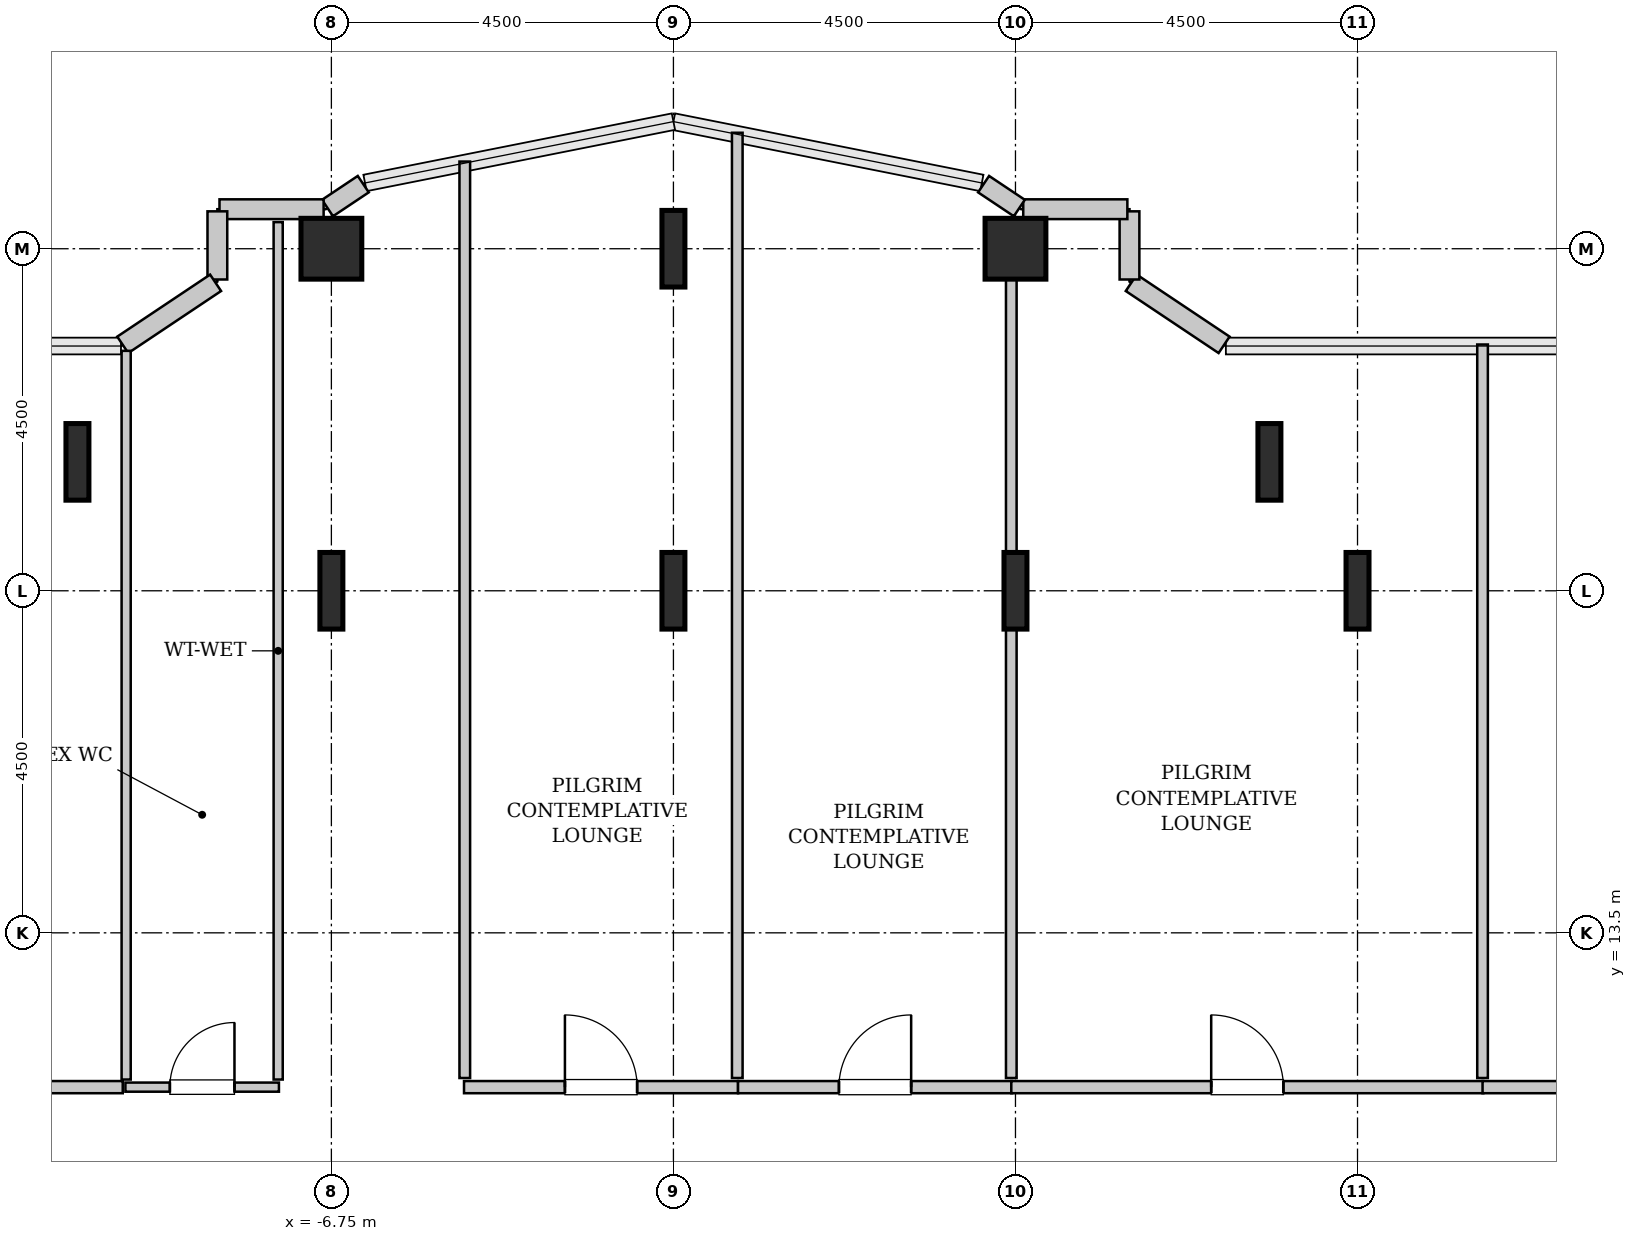
"""IFC4 building model, lengths in metres.
Left out: names, types, materials, properties, quantities, classifications, styles, units other than length and angle.
Written with IfcOpenShell. Run it as: python <this file> out.ifc"""

import sys

from ifc_helpers import new_model, si_unit, direction, frame, frame_2d, origin, origin_2d, place, context, subcontext, project, spatial, rectangle, hollow_rectangle, i_section, extrude, source, transform, mapped, element, fill, save


model = new_model("IFC4")
c1 = context("Model", 3, precision=1e-05, world=origin(), true_north=direction((0.0, 1.0)))
c2 = subcontext(c1, "Body", "Model", "MODEL_VIEW")
j1 = project(units=[si_unit("LENGTHUNIT", "METRE"), si_unit("PLANEANGLEUNIT", "RADIAN")], contexts=[c1])
p1 = place(None, origin())
s1 = spatial("IfcSite", under=j1, at=p1, CompositionType="ELEMENT")
p2 = place(p1, origin())
s2 = spatial("IfcBuilding", under=s1, at=p2, CompositionType="ELEMENT")
p3 = place(p2, frame((0.0, 0.0, 128.8)))
s3 = spatial("IfcBuildingStorey", under=s2, at=p3, CompositionType="ELEMENT", Elevation=128.8)
m1 = source(origin(), c2, "Body", "SweptSolid", [
    extrude(i_section(OverallWidth=0.302, OverallDepth=1.008, WebThickness=0.021, FlangeThickness=0.04, FilletRadius=0.03, at=origin_2d()), origin(), (0.0, 0.0, 1.0), 3.8),
])
for number, where, z_axis, x_axis in (
    (1, (-10.091, 19.696, 0.0), (0.0, 0.0, 1.0), (1.0, 0.0, 0.0)),
    (2, (-6.75, 18.0, 0.0), (0.0, 0.0, 1.0), (1.0, 0.0, 0.0)),
):
    element("IfcColumn", number, at=place(p3, frame(where, z_axis=z_axis, x_axis=x_axis)), inside=s3, PredefinedType="COLUMN", context=c2, shape_type="MappedRepresentation", body=[
        mapped(m1, transform((0.0, 0.0, 0.0), x_axis=(1.0, 0.0, 0.0), y_axis=(0.0, 1.0, 0.0), z_axis=(0.0, 0.0, 1.0), scale=1.0)),
    ])
m2 = source(origin(), c2, "Body", "SweptSolid", [
    extrude(hollow_rectangle(XDim=0.8, YDim=0.8, WallThickness=0.04, InnerFilletRadius=0.04, OuterFilletRadius=0.08, at=origin_2d()), origin(), (0.0, 0.0, 1.0), 3.8),
])
p4 = place(p3, frame((-6.75, 22.5, 0.0), z_axis=(0.0, 0.0, 1.0), x_axis=(1.0, 0.0, 0.0)))
e3 = element("IfcColumn", 3, at=p4, inside=s3, PredefinedType="COLUMN", context=c2, shape_type="MappedRepresentation", body=[
    mapped(m2, transform((0.0, 0.0, 0.0), x_axis=(1.0, 0.0, 0.0), y_axis=(0.0, 1.0, 0.0), z_axis=(0.0, 0.0, 1.0), scale=1.0)),
])
for number, where, z_axis, x_axis in (
    (4, (-2.25, 18.0, 0.0), (0.0, 0.0, 1.0), (1.0, 0.0, 0.0)),
    (5, (-2.25, 22.5, 0.0), (0.0, 0.0, 1.0), (1.0, 0.0, 0.0)),
    (6, (2.25, 18.0, 0.0), (0.0, 0.0, 1.0), (1.0, 0.0, 0.0)),
):
    element("IfcColumn", number, at=place(p3, frame(where, z_axis=z_axis, x_axis=x_axis)), inside=s3, PredefinedType="COLUMN", context=c2, shape_type="MappedRepresentation", body=[
        mapped(m1, transform((0.0, 0.0, 0.0), x_axis=(1.0, 0.0, 0.0), y_axis=(0.0, 1.0, 0.0), z_axis=(0.0, 0.0, 1.0), scale=1.0)),
    ])
p5 = place(p3, frame((2.25, 22.5, 0.0), z_axis=(0.0, 0.0, 1.0), x_axis=(1.0, 0.0, 0.0)))
e7 = element("IfcColumn", 7, at=p5, inside=s3, PredefinedType="COLUMN", context=c2, shape_type="MappedRepresentation", body=[
    mapped(m2, transform((0.0, 0.0, 0.0), x_axis=(1.0, 0.0, 0.0), y_axis=(0.0, 1.0, 0.0), z_axis=(0.0, 0.0, 1.0), scale=1.0)),
])
for number, where, z_axis, x_axis in (
    (8, (5.591, 19.696, 0.0), (0.0, 0.0, 1.0), (1.0, 0.0, 0.0)),
    (9, (6.75, 18.0, 0.0), (0.0, 0.0, 1.0), (1.0, 0.0, 0.0)),
):
    element("IfcColumn", number, at=place(p3, frame(where, z_axis=z_axis, x_axis=x_axis)), inside=s3, PredefinedType="COLUMN", context=c2, shape_type="MappedRepresentation", body=[
        mapped(m1, transform((0.0, 0.0, 0.0), x_axis=(1.0, 0.0, 0.0), y_axis=(0.0, 1.0, 0.0), z_axis=(0.0, 0.0, 1.0), scale=1.0)),
    ])
m3 = source(origin(), c2, "Body", "SweptSolid", [
    extrude(rectangle(XDim=1.469, YDim=0.26, at=frame_2d((0.734, 0.0))), origin(), (0.0, 0.0, 1.0), 3.55),
])
p6 = place(p3, frame((4.995, 21.236, 0.0), z_axis=(0.0, 0.0, 1.0), x_axis=(-0.831461760506, 0.555581983884, 0.0)))
e10 = element("IfcWall", 10, at=p6, inside=s3, PredefinedType="SOLIDWALL", context=c2, shape_type="MappedRepresentation", body=[
    mapped(m3, transform((0.0, 0.0, 0.0), x_axis=(1.0, 0.0, 0.0), y_axis=(0.0, 1.0, 0.0), z_axis=(0.0, 0.0, 1.0), scale=1.0)),
])
m4 = source(origin(), c2, "Body", "SweptSolid", [
    extrude(rectangle(XDim=0.897, YDim=0.26, at=frame_2d((0.448, 0.0))), origin(), (0.0, 0.0, 1.0), 3.55),
])
p7 = place(p3, frame((3.75, 22.095, 0.0), z_axis=(0.0, 0.0, 1.0), x_axis=(0.0, 1.0, 0.0)))
e11 = element("IfcWall", 11, at=p7, inside=s3, PredefinedType="SOLIDWALL", context=c2, shape_type="MappedRepresentation", body=[
    mapped(m4, transform((0.0, 0.0, 0.0), x_axis=(1.0, 0.0, 0.0), y_axis=(0.0, 1.0, 0.0), z_axis=(0.0, 0.0, 1.0), scale=1.0)),
])
m5 = source(origin(), c2, "Body", "SweptSolid", [
    extrude(rectangle(XDim=1.37, YDim=0.26, at=frame_2d((0.685, 0.0))), origin(), (0.0, 0.0, 1.0), 3.55),
])
p8 = place(p3, frame((3.722, 23.02, 0.0), z_axis=(0.0, 0.0, 1.0), x_axis=(-1.0, 0.0, 0.0)))
e12 = element("IfcWall", 12, at=p8, inside=s3, PredefinedType="SOLIDWALL", context=c2, shape_type="MappedRepresentation", body=[
    mapped(m5, transform((0.0, 0.0, 0.0), x_axis=(1.0, 0.0, 0.0), y_axis=(0.0, 1.0, 0.0), z_axis=(0.0, 0.0, 1.0), scale=1.0)),
])
m6 = source(origin(), c2, "Body", "SweptSolid", [
    extrude(rectangle(XDim=0.565, YDim=0.26, at=frame_2d((0.283, 0.0))), origin(), (0.0, 0.0, 1.0), 3.55),
])
for number, where, z_axis, x_axis in (
    (13, (2.301, 23.036, 0.0), (0.0, 0.0, 1.0), (-0.832, 0.555, 0.0)),
    (14, (-6.331, 23.35, 0.0), (0.0, 0.0, 1.0), (-0.832, -0.555, 0.0)),
):
    element("IfcWall", number, at=place(p3, frame(where, z_axis=z_axis, x_axis=x_axis)), inside=s3, PredefinedType="SOLIDWALL", context=c2, shape_type="MappedRepresentation", body=[
        mapped(m6, transform((0.0, 0.0, 0.0), x_axis=(1.0, 0.0, 0.0), y_axis=(0.0, 1.0, 0.0), z_axis=(0.0, 0.0, 1.0), scale=1.0)),
    ])
p9 = place(p3, frame((-6.852, 23.02, 0.0), z_axis=(0.0, 0.0, 1.0), x_axis=(-1.0, 0.0, 0.0)))
e15 = element("IfcWall", 15, at=p9, inside=s3, PredefinedType="SOLIDWALL", context=c2, shape_type="MappedRepresentation", body=[
    mapped(m5, transform((0.0, 0.0, 0.0), x_axis=(1.0, 0.0, 0.0), y_axis=(0.0, 1.0, 0.0), z_axis=(0.0, 0.0, 1.0), scale=1.0)),
])
p10 = place(p3, frame((-8.25, 22.992, 0.0), z_axis=(0.0, 0.0, 1.0), x_axis=(0.0, -1.0, 0.0)))
e16 = element("IfcWall", 16, at=p10, inside=s3, PredefinedType="SOLIDWALL", context=c2, shape_type="MappedRepresentation", body=[
    mapped(m4, transform((0.0, 0.0, 0.0), x_axis=(1.0, 0.0, 0.0), y_axis=(0.0, 1.0, 0.0), z_axis=(0.0, 0.0, 1.0), scale=1.0)),
])
p11 = place(p3, frame((-8.273, 22.052, 0.0), z_axis=(0.0, 0.0, 1.0), x_axis=(-0.831461760506, -0.555581983884, 0.0)))
e17 = element("IfcWall", 17, at=p11, inside=s3, PredefinedType="SOLIDWALL", context=c2, shape_type="MappedRepresentation", body=[
    mapped(m3, transform((0.0, 0.0, 0.0), x_axis=(1.0, 0.0, 0.0), y_axis=(0.0, 1.0, 0.0), z_axis=(0.0, 0.0, 1.0), scale=1.0)),
])
m7 = source(origin(), c2, "Body", "SweptSolid", [
    extrude(rectangle(XDim=2.02, YDim=0.12, at=frame_2d((1.01, 0.0))), origin(), (0.0, 0.0, 1.0), 3.535),
])
p12 = place(p3, frame((-9.46, 11.47, 0.0), z_axis=(0.0, 0.0, 1.0), x_axis=(1.0, 0.0, 0.0)))
e18 = element("IfcWall", 18, at=p12, inside=s3, PredefinedType="PLUMBINGWALL", context=c2, shape_type="MappedRepresentation", body=[
    mapped(m7, transform((0.0, 0.0, 0.0), x_axis=(1.0, 0.0, 0.0), y_axis=(0.0, 1.0, 0.0), z_axis=(0.0, 0.0, 1.0), scale=1.0)),
])
p13 = place(p12, frame((0.585, 0.0, 0.0)))
e19 = element("IfcOpeningElement", 19, at=p13, cuts=e18, PredefinedType="OPENING", context=c2, shape_type="SweptSolid", body=[
    extrude(rectangle(XDim=0.85, YDim=2.1, at=frame_2d((0.425, 1.05))), frame((0.0, 0.07, 0.0), z_axis=(0.0, -1.0, 0.0), x_axis=(1.0, 0.0, 0.0)), (0.0, 0.0, 1.0), 0.14),
])
m8 = source(origin(), c2, "Body", "SweptSolid", [
    extrude(rectangle(XDim=11.28, YDim=0.12, at=frame_2d((5.64, 0.0))), origin(), (0.0, 0.0, 1.0), 3.535),
])
p14 = place(p3, frame((-7.45, 11.57, 0.0), z_axis=(0.0, 0.0, 1.0), x_axis=(0.0, 1.0, 0.0)))
e20 = element("IfcWall", 20, at=p14, inside=s3, PredefinedType="PLUMBINGWALL", context=c2, shape_type="MappedRepresentation", body=[
    mapped(m8, transform((0.0, 0.0, 0.0), x_axis=(1.0, 0.0, 0.0), y_axis=(0.0, 1.0, 0.0), z_axis=(0.0, 0.0, 1.0), scale=1.0)),
])
m9 = source(origin(), c2, "Body", "SweptSolid", [
    extrude(rectangle(XDim=9.587, YDim=0.12, at=frame_2d((4.793, 0.0))), origin(), (0.0, 0.0, 1.0), 3.535),
])
p15 = place(p3, frame((-9.45, 11.57, 0.0), z_axis=(0.0, 0.0, 1.0), x_axis=(0.0, 1.0, 0.0)))
e21 = element("IfcWall", 21, at=p15, inside=s3, PredefinedType="PLUMBINGWALL", context=c2, shape_type="MappedRepresentation", body=[
    mapped(m9, transform((0.0, 0.0, 0.0), x_axis=(1.0, 0.0, 0.0), y_axis=(0.0, 1.0, 0.0), z_axis=(0.0, 0.0, 1.0), scale=1.0)),
])
m10 = source(origin(), c2, "Body", "SweptSolid", [
    extrude(rectangle(XDim=4.125, YDim=0.16, at=frame_2d((2.062, 0.0))), origin(), (0.0, 0.0, 1.0), 3.535),
])
p16 = place(p3, frame((-13.62, 11.47, 0.0), z_axis=(0.0, 0.0, 1.0), x_axis=(1.0, 0.0, 0.0)))
e22 = element("IfcWall", 22, at=p16, inside=s3, PredefinedType="PARTITIONING", context=c2, shape_type="MappedRepresentation", body=[
    mapped(m10, transform((0.0, 0.0, 0.0), x_axis=(1.0, 0.0, 0.0), y_axis=(0.0, 1.0, 0.0), z_axis=(0.0, 0.0, 1.0), scale=1.0)),
])
p17 = place(p16, frame((1.587, 0.0, 0.0)))
e23 = element("IfcOpeningElement", 23, at=p17, cuts=e22, PredefinedType="OPENING", context=c2, shape_type="SweptSolid", body=[
    extrude(rectangle(XDim=0.95, YDim=2.1, at=frame_2d((0.475, 1.05))), frame((0.0, 0.09, 0.0), z_axis=(0.0, -1.0, 0.0), x_axis=(1.0, 0.0, 0.0)), (0.0, 0.0, 1.0), 0.18),
])
m11 = source(origin(), c2, "Body", "SweptSolid", [
    extrude(rectangle(XDim=3.605, YDim=0.16, at=frame_2d((1.802, 0.0))), origin(), (0.0, 0.0, 1.0), 3.535),
])
p18 = place(p3, frame((-5.005, 11.47, 0.0), z_axis=(0.0, 0.0, 1.0), x_axis=(1.0, 0.0, 0.0)))
e24 = element("IfcWall", 24, at=p18, inside=s3, PredefinedType="PARTITIONING", context=c2, shape_type="MappedRepresentation", body=[
    mapped(m11, transform((0.0, 0.0, 0.0), x_axis=(1.0, 0.0, 0.0), y_axis=(0.0, 1.0, 0.0), z_axis=(0.0, 0.0, 1.0), scale=1.0)),
])
p19 = place(p18, frame((1.327, 0.0, 0.0)))
e25 = element("IfcOpeningElement", 25, at=p19, cuts=e24, PredefinedType="OPENING", context=c2, shape_type="SweptSolid", body=[
    extrude(rectangle(XDim=0.95, YDim=2.1, at=frame_2d((0.475, 1.05))), frame((0.0, 0.09, 0.0), z_axis=(0.0, -1.0, 0.0), x_axis=(1.0, 0.0, 0.0)), (0.0, 0.0, 1.0), 0.18),
])
m12 = source(origin(), c2, "Body", "SweptSolid", [
    extrude(rectangle(XDim=12.436, YDim=0.14, at=frame_2d((6.218, 0.0))), origin(), (0.0, 0.0, 1.0), 3.535),
])
p20 = place(p3, frame((-1.41, 11.59, 0.0), z_axis=(0.0, 0.0, 1.0), x_axis=(0.0, 1.0, 0.0)))
e26 = element("IfcWall", 26, at=p20, inside=s3, PredefinedType="PARTITIONING", context=c2, shape_type="MappedRepresentation", body=[
    mapped(m12, transform((0.0, 0.0, 0.0), x_axis=(1.0, 0.0, 0.0), y_axis=(0.0, 1.0, 0.0), z_axis=(0.0, 0.0, 1.0), scale=1.0)),
])
m13 = source(origin(), c2, "Body", "SweptSolid", [
    extrude(rectangle(XDim=12.057, YDim=0.14, at=frame_2d((6.028, 0.0))), origin(), (0.0, 0.0, 1.0), 3.535),
])
p21 = place(p3, frame((-4.995, 11.59, 0.0), z_axis=(0.0, 0.0, 1.0), x_axis=(0.0, 1.0, 0.0)))
e27 = element("IfcWall", 27, at=p21, inside=s3, PredefinedType="PARTITIONING", context=c2, shape_type="MappedRepresentation", body=[
    mapped(m13, transform((0.0, 0.0, 0.0), x_axis=(1.0, 0.0, 0.0), y_axis=(0.0, 1.0, 0.0), z_axis=(0.0, 0.0, 1.0), scale=1.0)),
])
p22 = place(p3, frame((-1.4, 11.47, 0.0), z_axis=(0.0, 0.0, 1.0), x_axis=(1.0, 0.0, 0.0)))
e28 = element("IfcWall", 28, at=p22, inside=s3, PredefinedType="PARTITIONING", context=c2, shape_type="MappedRepresentation", body=[
    mapped(m11, transform((0.0, 0.0, 0.0), x_axis=(1.0, 0.0, 0.0), y_axis=(0.0, 1.0, 0.0), z_axis=(0.0, 0.0, 1.0), scale=1.0)),
])
p23 = place(p22, frame((1.327, 0.0, 0.0)))
e29 = element("IfcOpeningElement", 29, at=p23, cuts=e28, PredefinedType="OPENING", context=c2, shape_type="SweptSolid", body=[
    extrude(rectangle(XDim=0.95, YDim=2.1, at=frame_2d((0.475, 1.05))), frame((0.0, 0.09, 0.0), z_axis=(0.0, -1.0, 0.0), x_axis=(1.0, 0.0, 0.0)), (0.0, 0.0, 1.0), 0.18),
])
m14 = source(origin(), c2, "Body", "SweptSolid", [
    extrude(rectangle(XDim=11.314, YDim=0.14, at=frame_2d((5.657, 0.0))), origin(), (0.0, 0.0, 1.0), 2.875),
])
p24 = place(p3, frame((2.195, 11.59, 0.0), z_axis=(0.0, 0.0, 1.0), x_axis=(0.0, 1.0, 0.0)))
e30 = element("IfcWall", 30, at=p24, inside=s3, PredefinedType="PARTITIONING", context=c2, shape_type="MappedRepresentation", body=[
    mapped(m14, transform((0.0, 0.0, 0.0), x_axis=(1.0, 0.0, 0.0), y_axis=(0.0, 1.0, 0.0), z_axis=(0.0, 0.0, 1.0), scale=1.0)),
])
m15 = source(origin(), c2, "Body", "SweptSolid", [
    extrude(rectangle(XDim=6.21, YDim=0.16, at=frame_2d((3.105, 0.0))), origin(), (0.0, 0.0, 1.0), 3.535),
])
p25 = place(p3, frame((2.195, 11.47, 0.0), z_axis=(0.0, 0.0, 1.0), x_axis=(1.0, 0.0, 0.0)))
e31 = element("IfcWall", 31, at=p25, inside=s3, PredefinedType="PARTITIONING", context=c2, shape_type="MappedRepresentation", body=[
    mapped(m15, transform((0.0, 0.0, 0.0), x_axis=(1.0, 0.0, 0.0), y_axis=(0.0, 1.0, 0.0), z_axis=(0.0, 0.0, 1.0), scale=1.0)),
])
p26 = place(p25, frame((2.63, 0.0, 0.0)))
e32 = element("IfcOpeningElement", 32, at=p26, cuts=e31, PredefinedType="OPENING", context=c2, shape_type="SweptSolid", body=[
    extrude(rectangle(XDim=0.95, YDim=2.1, at=frame_2d((0.475, 1.05))), frame((0.0, 0.09, 0.0), z_axis=(0.0, -1.0, 0.0), x_axis=(1.0, 0.0, 0.0)), (0.0, 0.0, 1.0), 0.18),
])
m16 = source(origin(), c2, "Body", "SweptSolid", [
    extrude(rectangle(XDim=9.65, YDim=0.14, at=frame_2d((4.825, 0.0))), origin(), (0.0, 0.0, 1.0), 3.535),
])
p27 = place(p3, frame((8.395, 11.59, 0.0), z_axis=(0.0, 0.0, 1.0), x_axis=(0.0, 1.0, 0.0)))
e33 = element("IfcWall", 33, at=p27, inside=s3, PredefinedType="PARTITIONING", context=c2, shape_type="MappedRepresentation", body=[
    mapped(m16, transform((0.0, 0.0, 0.0), x_axis=(1.0, 0.0, 0.0), y_axis=(0.0, 1.0, 0.0), z_axis=(0.0, 0.0, 1.0), scale=1.0)),
])
m17 = source(origin(), c2, "Body", "SweptSolid", [
    extrude(rectangle(XDim=5.225, YDim=0.16, at=frame_2d((2.613, 0.0))), origin(), (0.0, 0.0, 1.0), 3.535),
])
p28 = place(p3, frame((8.395, 11.47, 0.0), z_axis=(0.0, 0.0, 1.0), x_axis=(1.0, 0.0, 0.0)))
e34 = element("IfcWall", 34, at=p28, inside=s3, PredefinedType="PARTITIONING", context=c2, shape_type="MappedRepresentation", body=[
    mapped(m17, transform((0.0, 0.0, 0.0), x_axis=(1.0, 0.0, 0.0), y_axis=(0.0, 1.0, 0.0), z_axis=(0.0, 0.0, 1.0), scale=1.0)),
])
p29 = place(p28, frame((2.137, 0.0, 0.0)))
e35 = element("IfcOpeningElement", 35, at=p29, cuts=e34, PredefinedType="OPENING", context=c2, shape_type="SweptSolid", body=[
    extrude(rectangle(XDim=0.95, YDim=2.1, at=frame_2d((0.475, 1.05))), frame((0.0, 0.09, 0.0), z_axis=(0.0, -1.0, 0.0), x_axis=(1.0, 0.0, 0.0)), (0.0, 0.0, 1.0), 0.18),
])
m18 = source(origin(), c2, "Body", "SweptSolid", [
    extrude(rectangle(XDim=0.85, YDim=2.1, at=frame_2d((0.425, 1.05))), frame((0.0, 0.025, 0.0), z_axis=(0.0, -1.0, 0.0), x_axis=(1.0, 0.0, 0.0)), (0.0, 0.0, 1.0), 0.05),
])
p30 = place(p13, origin())
e36 = element("IfcDoor", 36, at=p30, inside=s3, OperationType="SINGLE_SWING_RIGHT", PredefinedType="DOOR", context=c2, shape_type="MappedRepresentation", body=[
    mapped(m18, transform((0.0, 0.0, 0.0), x_axis=(1.0, 0.0, 0.0), y_axis=(0.0, 1.0, 0.0), z_axis=(0.0, 0.0, 1.0), scale=1.0)),
])
fill(e19, e36)
m19 = source(origin(), c2, "Body", "SweptSolid", [
    extrude(rectangle(XDim=0.95, YDim=2.1, at=frame_2d((0.475, 1.05))), frame((0.0, 0.025, 0.0), z_axis=(0.0, -1.0, 0.0), x_axis=(1.0, 0.0, 0.0)), (0.0, 0.0, 1.0), 0.05),
])
p31 = place(p19, origin())
e37 = element("IfcDoor", 37, at=p31, inside=s3, OperationType="SINGLE_SWING_LEFT", PredefinedType="DOOR", context=c2, shape_type="MappedRepresentation", body=[
    mapped(m19, transform((0.0, 0.0, 0.0), x_axis=(1.0, 0.0, 0.0), y_axis=(0.0, 1.0, 0.0), z_axis=(0.0, 0.0, 1.0), scale=1.0)),
])
fill(e25, e37)
p32 = place(p23, origin())
e38 = element("IfcDoor", 38, at=p32, inside=s3, OperationType="SINGLE_SWING_RIGHT", PredefinedType="DOOR", context=c2, shape_type="MappedRepresentation", body=[
    mapped(m19, transform((0.0, 0.0, 0.0), x_axis=(1.0, 0.0, 0.0), y_axis=(0.0, 1.0, 0.0), z_axis=(0.0, 0.0, 1.0), scale=1.0)),
])
fill(e29, e38)
p33 = place(p26, origin())
e39 = element("IfcDoor", 39, at=p33, inside=s3, OperationType="SINGLE_SWING_LEFT", PredefinedType="DOOR", context=c2, shape_type="MappedRepresentation", body=[
    mapped(m19, transform((0.0, 0.0, 0.0), x_axis=(1.0, 0.0, 0.0), y_axis=(0.0, 1.0, 0.0), z_axis=(0.0, 0.0, 1.0), scale=1.0)),
])
fill(e32, e39)
save(model, sys.argv[1])
